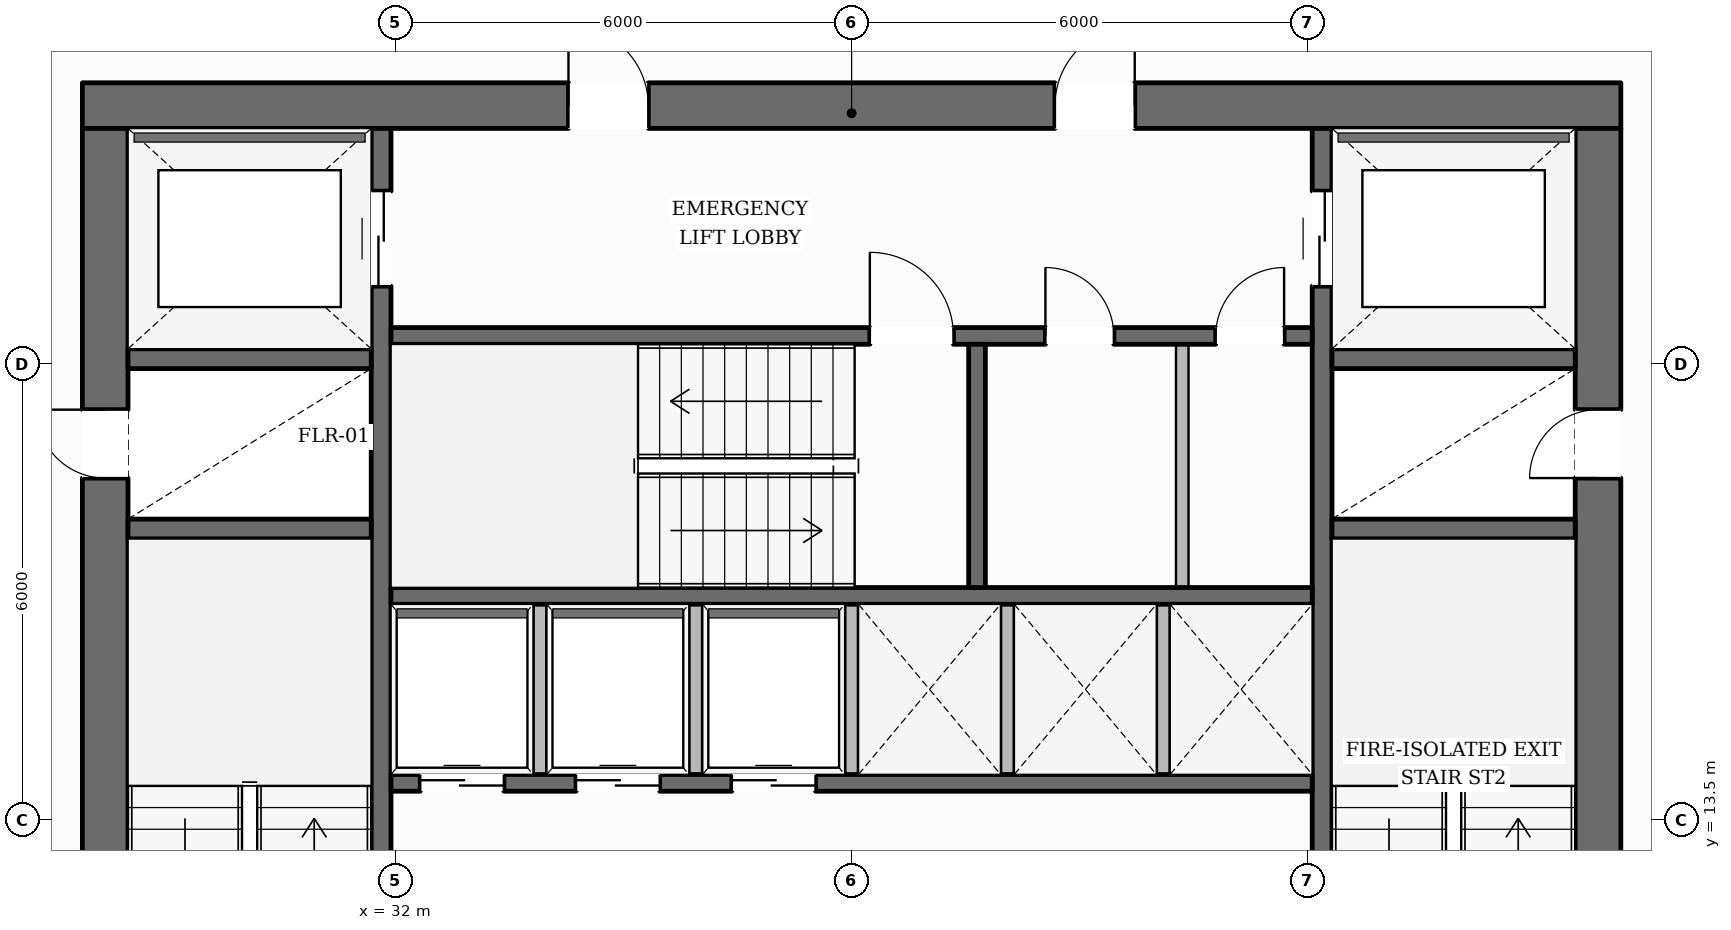
"""IFC4 building model, lengths in metres.
Left out: names, types, materials, properties, quantities, classifications, styles, units other than length and angle.
Written with IfcOpenShell. Run it as: python <this file> out.ifc"""

import sys

from ifc_helpers import new_model, si_unit, direction, frame, frame_2d, origin, place, context, subcontext, project, spatial, rectangle, extrude, element, fill, save


model = new_model("IFC4")
c1 = context("Model", 3, precision=1e-05, world=origin(), true_north=direction((0.0, 1.0)))
c2 = subcontext(c1, "Body", "Model", "MODEL_VIEW")
j1 = project(units=[si_unit("LENGTHUNIT", "METRE"), si_unit("PLANEANGLEUNIT", "RADIAN")], contexts=[c1])
p1 = place(None, origin())
s1 = spatial("IfcSite", under=j1, at=p1, CompositionType="ELEMENT")
p2 = place(p1, origin())
s2 = spatial("IfcBuilding", under=s1, at=p2, CompositionType="ELEMENT")
p3 = place(p2, frame((0.0, 0.0, 9.85)))
s3 = spatial("IfcBuildingStorey", under=s2, at=p3, CompositionType="ELEMENT", Elevation=9.85)
p4 = place(p3, frame((27.88, 22.9, 0.0), z_axis=(0.0, 0.0, 1.0), x_axis=(1.0, 0.0, 0.0)))
e1 = element("IfcWall", 1, at=p4, inside=s3, PredefinedType="SOLIDWALL", context=c2, shape_type="SweptSolid", body=[
    extrude(rectangle(XDim=20.24, YDim=0.6, at=frame_2d((10.12, 0.0))), origin(), (0.0, 0.0, 1.0), 3.59),
])
p5 = place(p4, frame((6.395, 0.0, 0.0)))
e2 = element("IfcOpeningElement", 2, at=p5, cuts=e1, PredefinedType="OPENING", context=c2, shape_type="SweptSolid", body=[
    extrude(rectangle(XDim=1.05, YDim=2.15, at=frame_2d((0.525, 1.075))), frame((0.0, 0.31, 0.0), z_axis=(0.0, -1.0, 0.0), x_axis=(1.0, 0.0, 0.0)), (0.0, 0.0, 1.0), 0.62),
])
p6 = place(p4, frame((12.795, 0.0, 0.0)))
e3 = element("IfcOpeningElement", 3, at=p6, cuts=e1, PredefinedType="OPENING", context=c2, shape_type="SweptSolid", body=[
    extrude(rectangle(XDim=1.05, YDim=2.15, at=frame_2d((0.525, 1.075))), frame((0.0, 0.31, 0.0), z_axis=(0.0, -1.0, 0.0), x_axis=(1.0, 0.0, 0.0)), (0.0, 0.0, 1.0), 0.62),
])
p7 = place(p3, frame((28.18, 9.6, 0.0), z_axis=(0.0, 0.0, 1.0), x_axis=(0.0, 1.0, 0.0)))
e4 = element("IfcWall", 4, at=p7, inside=s3, PredefinedType="SOLIDWALL", context=c2, shape_type="SweptSolid", body=[
    extrude(rectangle(XDim=13.0, YDim=0.6, at=frame_2d((6.5, 0.0))), origin(), (0.0, 0.0, 1.0), 3.59),
])
p8 = place(p7, frame((0.2, 0.0, 0.0)))
e5 = element("IfcOpeningElement", 5, at=p8, cuts=e4, PredefinedType="OPENING", context=c2, shape_type="SweptSolid", body=[
    extrude(rectangle(XDim=1.1, YDim=2.15, at=frame_2d((0.55, 1.075))), frame((0.0, 0.31, 0.0), z_axis=(0.0, -1.0, 0.0), x_axis=(1.0, 0.0, 0.0)), (0.0, 0.0, 1.0), 0.62),
])
p9 = place(p7, frame((8.4, 0.0, 0.0)))
e6 = element("IfcOpeningElement", 6, at=p9, cuts=e4, PredefinedType="OPENING", context=c2, shape_type="SweptSolid", body=[
    extrude(rectangle(XDim=0.9, YDim=2.1, at=frame_2d((0.45, 1.05))), frame((0.0, 0.31, 0.0), z_axis=(0.0, -1.0, 0.0), x_axis=(1.0, 0.0, 0.0)), (0.0, 0.0, 1.0), 0.62),
])
p10 = place(p3, frame((47.82, 9.6, 0.0), z_axis=(0.0, 0.0, 1.0), x_axis=(0.0, 1.0, 0.0)))
e7 = element("IfcWall", 7, at=p10, inside=s3, PredefinedType="SOLIDWALL", context=c2, shape_type="SweptSolid", body=[
    extrude(rectangle(XDim=13.0, YDim=0.6, at=frame_2d((6.5, 0.0))), origin(), (0.0, 0.0, 1.0), 3.59),
])
p11 = place(p10, frame((0.2, 0.0, 0.0)))
e8 = element("IfcOpeningElement", 8, at=p11, cuts=e7, PredefinedType="OPENING", context=c2, shape_type="SweptSolid", body=[
    extrude(rectangle(XDim=1.1, YDim=2.15, at=frame_2d((0.55, 1.075))), frame((0.0, 0.31, 0.0), z_axis=(0.0, -1.0, 0.0), x_axis=(1.0, 0.0, 0.0)), (0.0, 0.0, 1.0), 0.62),
])
p12 = place(p10, frame((8.4, 0.0, 0.0)))
e9 = element("IfcOpeningElement", 9, at=p12, cuts=e7, PredefinedType="OPENING", context=c2, shape_type="SweptSolid", body=[
    extrude(rectangle(XDim=0.9, YDim=2.1, at=frame_2d((0.45, 1.05))), frame((0.0, 0.31, 0.0), z_axis=(0.0, -1.0, 0.0), x_axis=(1.0, 0.0, 0.0)), (0.0, 0.0, 1.0), 0.62),
])
p13 = place(p3, frame((31.81, 9.6, 0.0), z_axis=(0.0, 0.0, 1.0), x_axis=(0.0, 1.0, 0.0)))
e10 = element("IfcWall", 10, at=p13, inside=s3, PredefinedType="SHEAR", context=c2, shape_type="SweptSolid", body=[
    extrude(rectangle(XDim=13.0, YDim=0.26, at=frame_2d((6.5, 0.0))), origin(), (0.0, 0.0, 1.0), 3.59),
])
p14 = place(p13, frame((10.925, 0.0, 0.0)))
e11 = element("IfcOpeningElement", 11, at=p14, cuts=e10, PredefinedType="OPENING", context=c2, shape_type="SweptSolid", body=[
    extrude(rectangle(XDim=1.25, YDim=2.25, at=frame_2d((0.625, 1.125))), frame((0.0, 0.14, 0.0), z_axis=(0.0, -1.0, 0.0), x_axis=(1.0, 0.0, 0.0)), (0.0, 0.0, 1.0), 0.28),
])
p15 = place(p3, frame((44.19, 9.6, 0.0), z_axis=(0.0, 0.0, 1.0), x_axis=(0.0, 1.0, 0.0)))
e12 = element("IfcWall", 12, at=p15, inside=s3, PredefinedType="SHEAR", context=c2, shape_type="SweptSolid", body=[
    extrude(rectangle(XDim=13.0, YDim=0.26, at=frame_2d((6.5, 0.0))), origin(), (0.0, 0.0, 1.0), 3.59),
])
p16 = place(p15, frame((10.925, 0.0, 0.0)))
e13 = element("IfcOpeningElement", 13, at=p16, cuts=e12, PredefinedType="OPENING", context=c2, shape_type="SweptSolid", body=[
    extrude(rectangle(XDim=1.25, YDim=2.25, at=frame_2d((0.625, 1.125))), frame((0.0, 0.14, 0.0), z_axis=(0.0, -1.0, 0.0), x_axis=(1.0, 0.0, 0.0)), (0.0, 0.0, 1.0), 0.28),
])
for number, where, z_axis, x_axis in (
    (14, (28.48, 17.33, 0.0), (0.0, 0.0, 1.0), (1.0, 0.0, 0.0)),
    (15, (28.48, 19.57, 0.0), (0.0, 0.0, 1.0), (1.0, 0.0, 0.0)),
    (16, (44.32, 17.33, 0.0), (0.0, 0.0, 1.0), (1.0, 0.0, 0.0)),
    (17, (44.32, 19.57, 0.0), (0.0, 0.0, 1.0), (1.0, 0.0, 0.0)),
):
    element("IfcWall", number, at=place(p3, frame(where, z_axis=z_axis, x_axis=x_axis)), inside=s3, PredefinedType="SHEAR", context=c2, shape_type="SweptSolid", body=[
        extrude(rectangle(XDim=3.2, YDim=0.26, at=frame_2d((1.6, 0.0))), origin(), (0.0, 0.0, 1.0), 3.59),
    ])
p17 = place(p3, frame((31.94, 19.87, 0.0), z_axis=(0.0, 0.0, 1.0), x_axis=(1.0, 0.0, 0.0)))
e18 = element("IfcWall", 18, at=p17, inside=s3, PredefinedType="SOLIDWALL", context=c2, shape_type="SweptSolid", body=[
    extrude(rectangle(XDim=12.12, YDim=0.22, at=frame_2d((6.06, 0.0))), origin(), (0.0, 0.0, 1.0), 3.59),
])
p18 = place(p17, frame((6.3, 0.0, 0.0)))
e19 = element("IfcOpeningElement", 19, at=p18, cuts=e18, PredefinedType="OPENING", context=c2, shape_type="SweptSolid", body=[
    extrude(rectangle(XDim=1.1, YDim=2.15, at=frame_2d((0.55, 1.075))), frame((0.0, 0.12, 0.0), z_axis=(0.0, -1.0, 0.0), x_axis=(1.0, 0.0, 0.0)), (0.0, 0.0, 1.0), 0.24),
])
p19 = place(p17, frame((8.61, 0.0, 0.0)))
e20 = element("IfcOpeningElement", 20, at=p19, cuts=e18, PredefinedType="OPENING", context=c2, shape_type="SweptSolid", body=[
    extrude(rectangle(XDim=0.9, YDim=2.1, at=frame_2d((0.45, 1.05))), frame((0.0, 0.12, 0.0), z_axis=(0.0, -1.0, 0.0), x_axis=(1.0, 0.0, 0.0)), (0.0, 0.0, 1.0), 0.24),
])
p20 = place(p17, frame((10.85, 0.0, 0.0)))
e21 = element("IfcOpeningElement", 21, at=p20, cuts=e18, PredefinedType="OPENING", context=c2, shape_type="SweptSolid", body=[
    extrude(rectangle(XDim=0.9, YDim=2.1, at=frame_2d((0.45, 1.05))), frame((0.0, 0.12, 0.0), z_axis=(0.0, -1.0, 0.0), x_axis=(1.0, 0.0, 0.0)), (0.0, 0.0, 1.0), 0.24),
])
p21 = place(p3, frame((31.94, 16.45, 0.0), z_axis=(0.0, 0.0, 1.0), x_axis=(1.0, 0.0, 0.0)))
e22 = element("IfcWall", 22, at=p21, inside=s3, PredefinedType="SOLIDWALL", context=c2, shape_type="SweptSolid", body=[
    extrude(rectangle(XDim=12.12, YDim=0.22, at=frame_2d((6.06, 0.0))), origin(), (0.0, 0.0, 1.0), 3.59),
])
p22 = place(p3, frame((39.65, 16.56, 0.0), z_axis=(0.0, 0.0, 1.0), x_axis=(0.0, 1.0, 0.0)))
e23 = element("IfcWall", 23, at=p22, inside=s3, PredefinedType="SOLIDWALL", context=c2, shape_type="SweptSolid", body=[
    extrude(rectangle(XDim=3.2, YDim=0.22, at=frame_2d((1.6, 0.0))), origin(), (0.0, 0.0, 1.0), 3.59),
])
p23 = place(p3, frame((31.94, 13.99, 0.0), z_axis=(0.0, 0.0, 1.0), x_axis=(1.0, 0.0, 0.0)))
e24 = element("IfcWall", 24, at=p23, inside=s3, PredefinedType="SOLIDWALL", context=c2, shape_type="SweptSolid", body=[
    extrude(rectangle(XDim=12.12, YDim=0.22, at=frame_2d((6.06, 0.0))), origin(), (0.0, 0.0, 1.0), 3.59),
])
p24 = place(p23, frame((0.385, 0.0, 0.0)))
e25 = element("IfcOpeningElement", 25, at=p24, cuts=e24, PredefinedType="OPENING", context=c2, shape_type="SweptSolid", body=[
    extrude(rectangle(XDim=1.1, YDim=2.2, at=frame_2d((0.55, 1.1))), frame((0.0, 0.12, 0.0), z_axis=(0.0, -1.0, 0.0), x_axis=(1.0, 0.0, 0.0)), (0.0, 0.0, 1.0), 0.24),
])
p25 = place(p23, frame((2.435, 0.0, 0.0)))
e26 = element("IfcOpeningElement", 26, at=p25, cuts=e24, PredefinedType="OPENING", context=c2, shape_type="SweptSolid", body=[
    extrude(rectangle(XDim=1.1, YDim=2.2, at=frame_2d((0.55, 1.1))), frame((0.0, 0.12, 0.0), z_axis=(0.0, -1.0, 0.0), x_axis=(1.0, 0.0, 0.0)), (0.0, 0.0, 1.0), 0.24),
])
p26 = place(p23, frame((4.485, 0.0, 0.0)))
e27 = element("IfcOpeningElement", 27, at=p26, cuts=e24, PredefinedType="OPENING", context=c2, shape_type="SweptSolid", body=[
    extrude(rectangle(XDim=1.1, YDim=2.2, at=frame_2d((0.55, 1.1))), frame((0.0, 0.12, 0.0), z_axis=(0.0, -1.0, 0.0), x_axis=(1.0, 0.0, 0.0)), (0.0, 0.0, 1.0), 0.24),
])
p27 = place(p3, frame((13.044, 15.027, 0.0), z_axis=(0.0, 0.0, 1.0), x_axis=(0.500616330433, 0.865669272704, 0.0)))
e28 = element("IfcWall", 28, at=p27, inside=s3, PredefinedType="STANDARD", context=c2, shape_type="SweptSolid", body=[
    extrude(rectangle(XDim=33.487, YDim=0.38, at=frame_2d((16.743, 0.0))), origin(), (0.0, 0.0, 1.0), 2.97),
])
p28 = place(p27, frame((7.972, 0.0, 0.0)))
e29 = element("IfcOpeningElement", 29, at=p28, cuts=e28, PredefinedType="OPENING", context=c2, shape_type="SweptSolid", body=[
    extrude(rectangle(XDim=1.0, YDim=2.2, at=frame_2d((0.5, 1.1))), frame((0.0, 0.2, 0.0), z_axis=(0.0, -1.0, 0.0), x_axis=(1.0, 0.0, 0.0)), (0.0, 0.0, 1.0), 0.4),
])
p29 = place(p27, frame((29.475, 0.0, 0.65)))
e30 = element("IfcOpeningElement", 30, at=p29, cuts=e28, PredefinedType="OPENING", context=c2, shape_type="SweptSolid", body=[
    extrude(rectangle(XDim=1.65, YDim=1.75, at=frame_2d((0.825, 0.875))), frame((0.0, 0.2, 0.0), z_axis=(0.0, -1.0, 0.0), x_axis=(1.0, 0.0, 0.0)), (0.0, 0.0, 1.0), 0.4),
])
p30 = place(p27, frame((24.052, 0.0, 0.65)))
e31 = element("IfcOpeningElement", 31, at=p30, cuts=e28, PredefinedType="OPENING", context=c2, shape_type="SweptSolid", body=[
    extrude(rectangle(XDim=1.65, YDim=1.75, at=frame_2d((0.825, 0.875))), frame((0.0, 0.2, 0.0), z_axis=(0.0, -1.0, 0.0), x_axis=(1.0, 0.0, 0.0)), (0.0, 0.0, 1.0), 0.4),
])
p31 = place(p27, frame((18.63, 0.0, 0.65)))
e32 = element("IfcOpeningElement", 32, at=p31, cuts=e28, PredefinedType="OPENING", context=c2, shape_type="SweptSolid", body=[
    extrude(rectangle(XDim=1.65, YDim=1.75, at=frame_2d((0.825, 0.875))), frame((0.0, 0.2, 0.0), z_axis=(0.0, -1.0, 0.0), x_axis=(1.0, 0.0, 0.0)), (0.0, 0.0, 1.0), 0.4),
])
p32 = place(p27, frame((2.362, 0.0, 0.65)))
e33 = element("IfcOpeningElement", 33, at=p32, cuts=e28, PredefinedType="OPENING", context=c2, shape_type="SweptSolid", body=[
    extrude(rectangle(XDim=1.65, YDim=1.75, at=frame_2d((0.825, 0.875))), frame((0.0, 0.2, 0.0), z_axis=(0.0, -1.0, 0.0), x_axis=(1.0, 0.0, 0.0)), (0.0, 0.0, 1.0), 0.4),
])
p33 = place(p3, frame((46.044, 44.103, 0.0), z_axis=(0.0, 0.0, 1.0), x_axis=(0.496189626602, -0.86821417545, 0.0)))
e34 = element("IfcWall", 34, at=p33, inside=s3, PredefinedType="STANDARD", context=c2, shape_type="SweptSolid", body=[
    extrude(rectangle(XDim=33.196, YDim=0.38, at=frame_2d((16.598, 0.0))), origin(), (0.0, 0.0, 1.0), 2.97),
])
p34 = place(p33, frame((7.899, 0.0, 0.0)))
e35 = element("IfcOpeningElement", 35, at=p34, cuts=e34, PredefinedType="OPENING", context=c2, shape_type="SweptSolid", body=[
    extrude(rectangle(XDim=1.0, YDim=2.2, at=frame_2d((0.5, 1.1))), frame((0.0, 0.2, 0.0), z_axis=(0.0, -1.0, 0.0), x_axis=(1.0, 0.0, 0.0)), (0.0, 0.0, 1.0), 0.4),
])
p35 = place(p33, frame((29.209, 0.0, 0.65)))
e36 = element("IfcOpeningElement", 36, at=p35, cuts=e34, PredefinedType="OPENING", context=c2, shape_type="SweptSolid", body=[
    extrude(rectangle(XDim=1.65, YDim=1.75, at=frame_2d((0.825, 0.875))), frame((0.0, 0.2, 0.0), z_axis=(0.0, -1.0, 0.0), x_axis=(1.0, 0.0, 0.0)), (0.0, 0.0, 1.0), 0.4),
])
p36 = place(p33, frame((23.835, 0.0, 0.65)))
e37 = element("IfcOpeningElement", 37, at=p36, cuts=e34, PredefinedType="OPENING", context=c2, shape_type="SweptSolid", body=[
    extrude(rectangle(XDim=1.65, YDim=1.75, at=frame_2d((0.825, 0.875))), frame((0.0, 0.2, 0.0), z_axis=(0.0, -1.0, 0.0), x_axis=(1.0, 0.0, 0.0)), (0.0, 0.0, 1.0), 0.4),
])
p37 = place(p33, frame((18.462, 0.0, 0.65)))
e38 = element("IfcOpeningElement", 38, at=p37, cuts=e34, PredefinedType="OPENING", context=c2, shape_type="SweptSolid", body=[
    extrude(rectangle(XDim=1.65, YDim=1.75, at=frame_2d((0.825, 0.875))), frame((0.0, 0.2, 0.0), z_axis=(0.0, -1.0, 0.0), x_axis=(1.0, 0.0, 0.0)), (0.0, 0.0, 1.0), 0.4),
])
p38 = place(p33, frame((2.342, 0.0, 0.65)))
e39 = element("IfcOpeningElement", 39, at=p38, cuts=e34, PredefinedType="OPENING", context=c2, shape_type="SweptSolid", body=[
    extrude(rectangle(XDim=1.65, YDim=1.75, at=frame_2d((0.825, 0.875))), frame((0.0, 0.2, 0.0), z_axis=(0.0, -1.0, 0.0), x_axis=(1.0, 0.0, 0.0)), (0.0, 0.0, 1.0), 0.4),
])
for number, where, z_axis, x_axis in (
    (40, (33.9, 14.1, 0.0), (0.0, 0.0, 1.0), (0.0, 1.0, 0.0)),
    (41, (35.95, 14.1, 0.0), (0.0, 0.0, 1.0), (0.0, 1.0, 0.0)),
    (42, (38.0, 14.1, 0.0), (0.0, 0.0, 1.0), (0.0, 1.0, 0.0)),
    (43, (40.05, 14.1, 0.0), (0.0, 0.0, 1.0), (0.0, 1.0, 0.0)),
    (44, (42.1, 14.1, 0.0), (0.0, 0.0, 1.0), (0.0, 1.0, 0.0)),
):
    element("IfcWall", number, at=place(p3, frame(where, z_axis=z_axis, x_axis=x_axis)), inside=s3, PredefinedType="PARTITIONING", context=c2, shape_type="SweptSolid", body=[
        extrude(rectangle(XDim=2.24, YDim=0.165, at=frame_2d((1.12, 0.0))), origin(), (0.0, 0.0, 1.0), 3.59),
    ])
p39 = place(p3, frame((42.35, 16.56, 0.0), z_axis=(0.0, 0.0, 1.0), x_axis=(0.0, 1.0, 0.0)))
e45 = element("IfcWall", 45, at=p39, inside=s3, PredefinedType="PARTITIONING", context=c2, shape_type="SweptSolid", body=[
    extrude(rectangle(XDim=3.2, YDim=0.165, at=frame_2d((1.6, 0.0))), origin(), (0.0, 0.0, 1.0), 3.59),
])
p40 = place(p18, origin())
e46 = element("IfcDoor", 46, at=p40, inside=s3, OperationType="SINGLE_SWING_LEFT", PredefinedType="DOOR", context=c2, shape_type="SweptSolid", body=[
    extrude(rectangle(XDim=1.1, YDim=2.15, at=frame_2d((0.55, 1.075))), frame((0.0, 0.025, 0.0), z_axis=(0.0, -1.0, 0.0), x_axis=(1.0, 0.0, 0.0)), (0.0, 0.0, 1.0), 0.05),
])
fill(e19, e46)
p41 = place(p9, origin())
e47 = element("IfcDoor", 47, at=p41, inside=s3, OperationType="SINGLE_SWING_RIGHT", PredefinedType="DOOR", context=c2, shape_type="SweptSolid", body=[
    extrude(rectangle(XDim=0.9, YDim=2.1, at=frame_2d((0.45, 1.05))), frame((0.0, 0.025, 0.0), z_axis=(0.0, -1.0, 0.0), x_axis=(1.0, 0.0, 0.0)), (0.0, 0.0, 1.0), 0.05),
])
fill(e6, e47)
p42 = place(p12, origin())
e48 = element("IfcDoor", 48, at=p42, inside=s3, OperationType="SINGLE_SWING_LEFT", PredefinedType="DOOR", context=c2, shape_type="SweptSolid", body=[
    extrude(rectangle(XDim=0.9, YDim=2.1, at=frame_2d((0.45, 1.05))), frame((0.0, 0.025, 0.0), z_axis=(0.0, -1.0, 0.0), x_axis=(1.0, 0.0, 0.0)), (0.0, 0.0, 1.0), 0.05),
])
fill(e9, e48)
p43 = place(p5, origin())
e49 = element("IfcDoor", 49, at=p43, inside=s3, OperationType="SINGLE_SWING_LEFT", PredefinedType="DOOR", context=c2, shape_type="SweptSolid", body=[
    extrude(rectangle(XDim=1.05, YDim=2.15, at=frame_2d((0.525, 1.075))), frame((0.0, 0.025, 0.0), z_axis=(0.0, -1.0, 0.0), x_axis=(1.0, 0.0, 0.0)), (0.0, 0.0, 1.0), 0.05),
])
fill(e2, e49)
p44 = place(p6, origin())
e50 = element("IfcDoor", 50, at=p44, inside=s3, OperationType="SINGLE_SWING_RIGHT", PredefinedType="DOOR", context=c2, shape_type="SweptSolid", body=[
    extrude(rectangle(XDim=1.05, YDim=2.15, at=frame_2d((0.525, 1.075))), frame((0.0, 0.025, 0.0), z_axis=(0.0, -1.0, 0.0), x_axis=(1.0, 0.0, 0.0)), (0.0, 0.0, 1.0), 0.05),
])
fill(e3, e50)
p45 = place(p14, origin())
e51 = element("IfcDoor", 51, at=p45, inside=s3, OperationType="DOUBLE_DOOR_SLIDING", PredefinedType="DOOR", context=c2, shape_type="SweptSolid", body=[
    extrude(rectangle(XDim=1.25, YDim=2.25, at=frame_2d((0.625, 1.125))), frame((0.0, 0.025, 0.0), z_axis=(0.0, -1.0, 0.0), x_axis=(1.0, 0.0, 0.0)), (0.0, 0.0, 1.0), 0.05),
])
fill(e11, e51)
p46 = place(p16, origin())
e52 = element("IfcDoor", 52, at=p46, inside=s3, OperationType="DOUBLE_DOOR_SLIDING", PredefinedType="DOOR", context=c2, shape_type="SweptSolid", body=[
    extrude(rectangle(XDim=1.25, YDim=2.25, at=frame_2d((0.625, 1.125))), frame((0.0, 0.025, 0.0), z_axis=(0.0, -1.0, 0.0), x_axis=(1.0, 0.0, 0.0)), (0.0, 0.0, 1.0), 0.05),
])
fill(e13, e52)
p47 = place(p24, origin())
e53 = element("IfcDoor", 53, at=p47, inside=s3, OperationType="DOUBLE_DOOR_SLIDING", PredefinedType="DOOR", context=c2, shape_type="SweptSolid", body=[
    extrude(rectangle(XDim=1.1, YDim=2.2, at=frame_2d((0.55, 1.1))), frame((0.0, 0.025, 0.0), z_axis=(0.0, -1.0, 0.0), x_axis=(1.0, 0.0, 0.0)), (0.0, 0.0, 1.0), 0.05),
])
fill(e25, e53)
p48 = place(p25, origin())
e54 = element("IfcDoor", 54, at=p48, inside=s3, OperationType="DOUBLE_DOOR_SLIDING", PredefinedType="DOOR", context=c2, shape_type="SweptSolid", body=[
    extrude(rectangle(XDim=1.1, YDim=2.2, at=frame_2d((0.55, 1.1))), frame((0.0, 0.025, 0.0), z_axis=(0.0, -1.0, 0.0), x_axis=(1.0, 0.0, 0.0)), (0.0, 0.0, 1.0), 0.05),
])
fill(e26, e54)
p49 = place(p26, origin())
e55 = element("IfcDoor", 55, at=p49, inside=s3, OperationType="DOUBLE_DOOR_SLIDING", PredefinedType="DOOR", context=c2, shape_type="SweptSolid", body=[
    extrude(rectangle(XDim=1.1, YDim=2.2, at=frame_2d((0.55, 1.1))), frame((0.0, 0.025, 0.0), z_axis=(0.0, -1.0, 0.0), x_axis=(1.0, 0.0, 0.0)), (0.0, 0.0, 1.0), 0.05),
])
fill(e27, e55)
p50 = place(p19, origin())
e56 = element("IfcDoor", 56, at=p50, inside=s3, OperationType="SINGLE_SWING_LEFT", PredefinedType="DOOR", context=c2, shape_type="SweptSolid", body=[
    extrude(rectangle(XDim=0.9, YDim=2.1, at=frame_2d((0.45, 1.05))), frame((0.0, 0.025, 0.0), z_axis=(0.0, -1.0, 0.0), x_axis=(1.0, 0.0, 0.0)), (0.0, 0.0, 1.0), 0.05),
])
fill(e20, e56)
p51 = place(p20, origin())
e57 = element("IfcDoor", 57, at=p51, inside=s3, OperationType="SINGLE_SWING_RIGHT", PredefinedType="DOOR", context=c2, shape_type="SweptSolid", body=[
    extrude(rectangle(XDim=0.9, YDim=2.1, at=frame_2d((0.45, 1.05))), frame((0.0, 0.025, 0.0), z_axis=(0.0, -1.0, 0.0), x_axis=(1.0, 0.0, 0.0)), (0.0, 0.0, 1.0), 0.05),
])
fill(e21, e57)
save(model, sys.argv[1])
